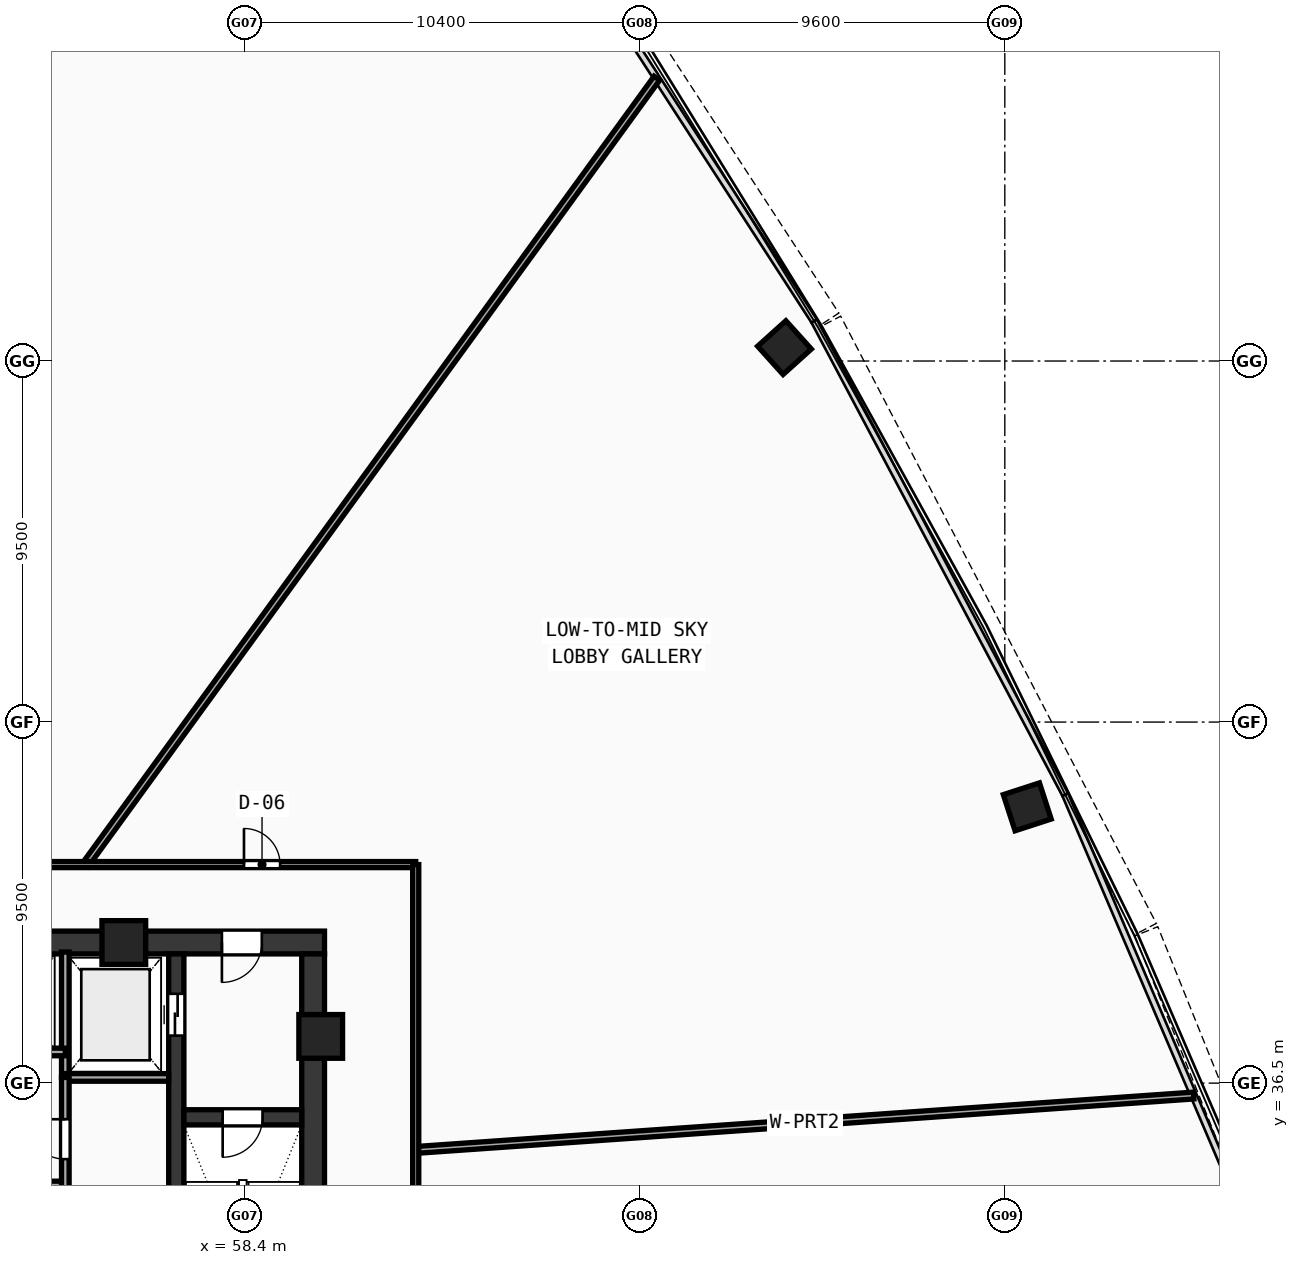
"""IFC4 building model, lengths in metres.
Left out: names, types, materials, properties, quantities, classifications, styles, units other than length and angle.
Written with IfcOpenShell. Run it as: python <this file> out.ifc"""

import sys

from ifc_helpers import new_model, si_unit, direction, frame, frame_2d, origin, origin_with_axes, origin_2d, place, context, subcontext, project, spatial, rectangle, hollow_rectangle, extrude, source, transform, mapped, element, fill, save


model = new_model("IFC4")
c1 = context("Model", 3, precision=1e-05, world=origin(), true_north=direction((0.0, 1.0)))
c2 = subcontext(c1, "Body", "Model", "MODEL_VIEW")
j1 = project(units=[si_unit("LENGTHUNIT", "METRE"), si_unit("PLANEANGLEUNIT", "RADIAN")], contexts=[c1])
p1 = place(None, origin())
s1 = spatial("IfcSite", under=j1, at=p1, CompositionType="ELEMENT")
p2 = place(p1, origin())
s2 = spatial("IfcBuilding", under=s1, at=p2, CompositionType="ELEMENT")
p3 = place(p2, frame((0.0, 0.0, 119.18)))
s3 = spatial("IfcBuildingStorey", under=s2, at=p3, CompositionType="ELEMENT", Elevation=119.18)
p4 = place(p3, frame((49.2, 40.2, 0.0), z_axis=(0.0, 0.0, 1.0), x_axis=(1.0, 0.0, 0.0)))
e1 = element("IfcWall", 1, at=p4, inside=s3, PredefinedType="SHEAR", context=c2, shape_type="SweptSolid", body=[
    extrude(rectangle(XDim=11.3, YDim=0.6, at=frame_2d((5.65, 0.0))), origin(), (0.0, 0.0, 1.0), 5.57),
])
p5 = place(p4, frame((8.6, 0.0, 0.0)))
e2 = element("IfcOpeningElement", 2, at=p5, cuts=e1, PredefinedType="OPENING", context=c2, shape_type="SweptSolid", body=[
    extrude(rectangle(XDim=1.05, YDim=2.1, at=frame_2d((0.525, 1.05))), frame((0.0, 0.31, 0.0), z_axis=(0.0, -1.0, 0.0), x_axis=(1.0, 0.0, 0.0)), (0.0, 0.0, 1.0), 0.62),
])
p6 = place(p3, frame((60.2, 27.8, 0.0), z_axis=(0.0, 0.0, 1.0), x_axis=(0.0, 1.0, 0.0)))
e3 = element("IfcWall", 3, at=p6, inside=s3, PredefinedType="SHEAR", context=c2, shape_type="SweptSolid", body=[
    extrude(rectangle(XDim=12.1, YDim=0.6, at=frame_2d((6.05, 0.0))), origin(), (0.0, 0.0, 1.0), 5.57),
])
p7 = place(p3, frame((56.6, 27.8, 0.0), z_axis=(0.0, 0.0, 1.0), x_axis=(0.0, 1.0, 0.0)))
e4 = element("IfcWall", 4, at=p7, inside=s3, PredefinedType="SHEAR", context=c2, shape_type="SweptSolid", body=[
    extrude(rectangle(XDim=12.1, YDim=0.4, at=frame_2d((6.05, 0.0))), origin(), (0.0, 0.0, 1.0), 5.57),
])
p8 = place(p7, frame((9.95, 0.0, 0.0)))
e5 = element("IfcOpeningElement", 5, at=p8, cuts=e4, PredefinedType="OPENING", context=c2, shape_type="SweptSolid", body=[
    extrude(rectangle(XDim=1.1, YDim=2.1, at=frame_2d((0.55, 1.05))), frame((0.0, 0.21, 0.0), z_axis=(0.0, -1.0, 0.0), x_axis=(1.0, 0.0, 0.0)), (0.0, 0.0, 1.0), 0.42),
])
p9 = place(p3, frame((56.8, 35.6, 0.0), z_axis=(0.0, 0.0, 1.0), x_axis=(1.0, 0.0, 0.0)))
e6 = element("IfcWall", 6, at=p9, inside=s3, PredefinedType="SHEAR", context=c2, shape_type="SweptSolid", body=[
    extrude(rectangle(XDim=3.1, YDim=0.4, at=frame_2d((1.55, 0.0))), origin(), (0.0, 0.0, 1.0), 5.57),
])
p10 = place(p9, frame((1.02, 0.0, 0.0)))
e7 = element("IfcOpeningElement", 7, at=p10, cuts=e6, PredefinedType="OPENING", context=c2, shape_type="SweptSolid", body=[
    extrude(rectangle(XDim=1.05, YDim=2.1, at=frame_2d((0.525, 1.05))), frame((0.0, 0.21, 0.0), z_axis=(0.0, -1.0, 0.0), x_axis=(1.0, 0.0, 0.0)), (0.0, 0.0, 1.0), 0.42),
])
m1 = source(origin(), c2, "Body", "SweptSolid", [
    extrude(hollow_rectangle(XDim=1.15, YDim=1.15, WallThickness=0.048, at=origin_2d()), origin(), (0.0, 0.0, 1.0), 5.85),
])
for number, where, z_axis, x_axis in (
    (8, (60.4, 37.729, -0.28), (0.0, 0.0, 1.0), (1.0, 0.0, 0.0)),
    (9, (55.219, 40.2, -0.28), (0.0, 0.0, 1.0), (1.0, 0.0, 0.0)),
):
    element("IfcColumn", number, at=place(p3, frame(where, z_axis=z_axis, x_axis=x_axis)), inside=s3, PredefinedType="COLUMN", context=c2, shape_type="MappedRepresentation", body=[
        mapped(m1, transform((0.0, 0.0, 0.0), scale=1.0)),
    ])
m2 = source(origin(), c2, "Body", "SweptSolid", [
    extrude(hollow_rectangle(XDim=1.0, YDim=1.0, WallThickness=0.042, at=origin_2d()), origin(), (0.0, 0.0, 1.0), 5.85),
])
for number, where, z_axis, x_axis in (
    (10, (78.991, 43.77, -0.28), (0.0, 0.0, 1.0), (-0.309, 0.951, 0.0)),
    (11, (72.603, 55.852, -0.28), (0.0, 0.0, 1.0), (-0.669, 0.743, 0.0)),
):
    element("IfcColumn", number, at=place(p3, frame(where, z_axis=z_axis, x_axis=x_axis)), inside=s3, PredefinedType="COLUMN", context=c2, shape_type="MappedRepresentation", body=[
        mapped(m2, transform((0.0, 0.0, 0.0), scale=1.0)),
    ])
p11 = place(p3, frame((53.68, 36.65, 0.0), z_axis=(0.0, 0.0, 1.0), x_axis=(0.0, 1.0, 0.0)))
e12 = element("IfcWall", 12, at=p11, inside=s3, PredefinedType="SOLIDWALL", context=c2, shape_type="SweptSolid", body=[
    extrude(rectangle(XDim=3.3, YDim=0.2, at=frame_2d((1.65, 0.0))), origin(), (0.0, 0.0, 1.0), 5.57),
])
p12 = place(p3, frame((53.68, 36.65, 0.0), z_axis=(0.0, 0.0, 1.0), x_axis=(1.0, 0.0, 0.0)))
e13 = element("IfcWall", 13, at=p12, inside=s3, PredefinedType="SOLIDWALL", context=c2, shape_type="SweptSolid", body=[
    extrude(rectangle(XDim=2.72, YDim=0.2, at=frame_2d((1.36, 0.0))), origin(), (0.0, 0.0, 1.0), 5.57),
])
p13 = place(p3, frame((48.95, 37.32, 0.0), z_axis=(0.0, 0.0, 1.0), x_axis=(1.0, 0.0, 0.0)))
e14 = element("IfcWall", 14, at=p13, inside=s3, PredefinedType="SOLIDWALL", context=c2, shape_type="SweptSolid", body=[
    extrude(rectangle(XDim=4.73, YDim=0.2, at=frame_2d((2.365, 0.0))), origin(), (0.0, 0.0, 1.0), 5.57),
])
p14 = place(p13, frame((0.65, 0.0, 0.0)))
e15 = element("IfcOpeningElement", 15, at=p14, cuts=e14, PredefinedType="OPENING", context=c2, shape_type="SweptSolid", body=[
    extrude(rectangle(XDim=1.05, YDim=2.1, at=frame_2d((0.525, 1.05))), frame((0.0, 0.11, 0.0), z_axis=(0.0, -1.0, 0.0), x_axis=(1.0, 0.0, 0.0)), (0.0, 0.0, 1.0), 0.22),
])
p15 = place(p13, frame((2.95, 0.0, 0.0)))
e16 = element("IfcOpeningElement", 16, at=p15, cuts=e14, PredefinedType="OPENING", context=c2, shape_type="SweptSolid", body=[
    extrude(rectangle(XDim=1.05, YDim=2.1, at=frame_2d((0.525, 1.05))), frame((0.0, 0.11, 0.0), z_axis=(0.0, -1.0, 0.0), x_axis=(1.0, 0.0, 0.0)), (0.0, 0.0, 1.0), 0.22),
])
p16 = place(p3, frame((43.85, 33.82, 0.0), z_axis=(0.0, 0.0, 1.0), x_axis=(1.0, 0.0, 0.0)))
e17 = element("IfcWall", 17, at=p16, inside=s3, PredefinedType="SOLIDWALL", context=c2, shape_type="SweptSolid", body=[
    extrude(rectangle(XDim=9.83, YDim=0.2, at=frame_2d((4.915, 0.0))), origin(), (0.0, 0.0, 1.0), 5.57),
])
p17 = place(p16, frame((0.575, 0.0, 0.0)))
e18 = element("IfcOpeningElement", 18, at=p17, cuts=e17, PredefinedType="OPENING", context=c2, shape_type="SweptSolid", body=[
    extrude(rectangle(XDim=1.05, YDim=2.1, at=frame_2d((0.525, 1.05))), frame((0.0, 0.11, 0.0), z_axis=(0.0, -1.0, 0.0), x_axis=(1.0, 0.0, 0.0)), (0.0, 0.0, 1.0), 0.22),
])
p18 = place(p16, frame((2.875, 0.0, 0.0)))
e19 = element("IfcOpeningElement", 19, at=p18, cuts=e17, PredefinedType="OPENING", context=c2, shape_type="SweptSolid", body=[
    extrude(rectangle(XDim=1.05, YDim=2.1, at=frame_2d((0.525, 1.05))), frame((0.0, 0.11, 0.0), z_axis=(0.0, -1.0, 0.0), x_axis=(1.0, 0.0, 0.0)), (0.0, 0.0, 1.0), 0.22),
])
p19 = place(p16, frame((5.175, 0.0, 0.0)))
e20 = element("IfcOpeningElement", 20, at=p19, cuts=e17, PredefinedType="OPENING", context=c2, shape_type="SweptSolid", body=[
    extrude(rectangle(XDim=1.05, YDim=2.1, at=frame_2d((0.525, 1.05))), frame((0.0, 0.11, 0.0), z_axis=(0.0, -1.0, 0.0), x_axis=(1.0, 0.0, 0.0)), (0.0, 0.0, 1.0), 0.22),
])
p20 = place(p16, frame((7.475, 0.0, 0.0)))
e21 = element("IfcOpeningElement", 21, at=p20, cuts=e17, PredefinedType="OPENING", context=c2, shape_type="SweptSolid", body=[
    extrude(rectangle(XDim=1.05, YDim=2.1, at=frame_2d((0.525, 1.05))), frame((0.0, 0.11, 0.0), z_axis=(0.0, -1.0, 0.0), x_axis=(1.0, 0.0, 0.0)), (0.0, 0.0, 1.0), 0.22),
])
p21 = place(p3, frame((53.68, 27.6, 0.0), z_axis=(0.0, 0.0, 1.0), x_axis=(0.0, 1.0, 0.0)))
e22 = element("IfcWall", 22, at=p21, inside=s3, PredefinedType="SOLIDWALL", context=c2, shape_type="SweptSolid", body=[
    extrude(rectangle(XDim=9.05, YDim=0.2, at=frame_2d((4.525, 0.0))), origin(), (0.0, 0.0, 1.0), 2.22),
])
p22 = place(p21, frame((6.9, 0.0, 0.0)))
e23 = element("IfcOpeningElement", 23, at=p22, cuts=e22, PredefinedType="OPENING", context=c2, shape_type="SweptSolid", body=[
    extrude(rectangle(XDim=1.05, YDim=2.1, at=frame_2d((0.525, 1.05))), frame((0.0, 0.11, 0.0), z_axis=(0.0, -1.0, 0.0), x_axis=(1.0, 0.0, 0.0)), (0.0, 0.0, 1.0), 0.22),
])
p23 = place(p3, frame((62.9, 34.742, 0.0), z_axis=(0.0, 0.0, 1.0), x_axis=(0.99756459993, 0.069748612653, 0.0)))
e24 = element("IfcWall", 24, at=p23, inside=s3, PredefinedType="PARTITIONING", context=c2, shape_type="SweptSolid", body=[
    extrude(rectangle(XDim=20.519, YDim=0.18, at=frame_2d((10.259, 0.0))), origin(), (0.0, 0.0, 1.0), 4.87),
])
p24 = place(p3, frame((54.212, 42.25, 0.0), z_axis=(0.0, 0.0, 1.0), x_axis=(0.587780549385, 0.809020411216, 0.0)))
e25 = element("IfcWall", 25, at=p24, inside=s3, PredefinedType="PARTITIONING", context=c2, shape_type="SweptSolid", body=[
    extrude(rectangle(XDim=25.575, YDim=0.18, at=frame_2d((12.788, 0.0))), origin(), (0.0, 0.0, 1.0), 4.87),
])
p25 = place(p3, frame((45.85, 42.25, 0.0), z_axis=(0.0, 0.0, 1.0), x_axis=(1.0, 0.0, 0.0)))
e26 = element("IfcWall", 26, at=p25, inside=s3, PredefinedType="PARTITIONING", context=c2, shape_type="SweptSolid", body=[
    extrude(rectangle(XDim=17.05, YDim=0.16, at=frame_2d((8.525, 0.0))), origin(), (0.0, 0.0, 1.0), 2.22),
])
p26 = place(p25, frame((12.531, 0.0, 0.0)))
e27 = element("IfcOpeningElement", 27, at=p26, cuts=e26, PredefinedType="OPENING", context=c2, shape_type="SweptSolid", body=[
    extrude(rectangle(XDim=0.95, YDim=2.1, at=frame_2d((0.475, 1.05))), frame((0.0, 0.09, 0.0), z_axis=(0.0, -1.0, 0.0), x_axis=(1.0, 0.0, 0.0)), (0.0, 0.0, 1.0), 0.18),
])
p27 = place(p3, frame((62.9, 42.25, 0.0), z_axis=(0.0, 0.0, 1.0), x_axis=(0.0, -1.0, 0.0)))
e28 = element("IfcWall", 28, at=p27, inside=s3, PredefinedType="PARTITIONING", context=c2, shape_type="SweptSolid", body=[
    extrude(rectangle(XDim=17.35, YDim=0.16, at=frame_2d((8.675, 0.0))), origin(), (0.0, 0.0, 1.0), 2.22),
])
p28 = place(p27, frame((12.254, 0.0, 0.0)))
e29 = element("IfcOpeningElement", 29, at=p28, cuts=e28, PredefinedType="OPENING", context=c2, shape_type="SweptSolid", body=[
    extrude(rectangle(XDim=0.95, YDim=2.1, at=frame_2d((0.475, 1.05))), frame((0.0, 0.09, 0.0), z_axis=(0.0, -1.0, 0.0), x_axis=(1.0, 0.0, 0.0)), (0.0, 0.0, 1.0), 0.18),
])
m3 = source(origin(), c2, "Body", "SweptSolid", [
    extrude(rectangle(XDim=1.05, YDim=2.1, at=frame_2d((0.525, 1.05))), frame((0.0, 0.025, 0.0), z_axis=(0.0, -1.0, 0.0), x_axis=(1.0, 0.0, 0.0)), (0.0, 0.0, 1.0), 0.05),
])
p29 = place(p10, frame((1.05, 0.0, 0.0), z_axis=(0.0, 0.0, 1.0), x_axis=(-1.0, 0.0, 0.0)))
e30 = element("IfcDoor", 30, at=p29, inside=s3, OperationType="SINGLE_SWING_RIGHT", PredefinedType="DOOR", context=c2, shape_type="MappedRepresentation", body=[
    mapped(m3, transform((0.0, 0.0, 0.0), scale=1.0)),
])
fill(e7, e30)
p30 = place(p5, frame((1.05, 0.0, 0.0), z_axis=(0.0, 0.0, 1.0), x_axis=(-1.0, 0.0, 0.0)))
e31 = element("IfcDoor", 31, at=p30, inside=s3, OperationType="SINGLE_SWING_RIGHT", PredefinedType="DOOR", context=c2, shape_type="MappedRepresentation", body=[
    mapped(m3, transform((0.0, 0.0, 0.0), scale=1.0)),
])
fill(e2, e31)
m4 = source(origin(), c2, "Body", "SweptSolid", [
    extrude(rectangle(XDim=1.1, YDim=2.1, at=frame_2d((0.55, 1.05))), frame((0.0, 0.025, 0.0), z_axis=(0.0, -1.0, 0.0), x_axis=(1.0, 0.0, 0.0)), (0.0, 0.0, 1.0), 0.05),
])
p31 = place(p8, origin_with_axes())
e32 = element("IfcDoor", 32, at=p31, inside=s3, OperationType="DOUBLE_DOOR_SLIDING", PredefinedType="DOOR", context=c2, shape_type="MappedRepresentation", body=[
    mapped(m4, transform((0.0, 0.0, 0.0), scale=1.0)),
])
fill(e5, e32)
p32 = place(p22, origin_with_axes())
e33 = element("IfcDoor", 33, at=p32, inside=s3, OperationType="SINGLE_SWING_RIGHT", PredefinedType="DOOR", context=c2, shape_type="MappedRepresentation", body=[
    mapped(m3, transform((0.0, 0.0, 0.0), scale=1.0)),
])
fill(e23, e33)
m5 = source(origin(), c2, "Body", "SweptSolid", [
    extrude(rectangle(XDim=0.95, YDim=2.1, at=frame_2d((0.475, 1.05))), frame((0.0, 0.025, 0.0), z_axis=(0.0, -1.0, 0.0), x_axis=(1.0, 0.0, 0.0)), (0.0, 0.0, 1.0), 0.05),
])
p33 = place(p26, origin_with_axes())
e34 = element("IfcDoor", 34, at=p33, inside=s3, OperationType="SINGLE_SWING_LEFT", PredefinedType="DOOR", context=c2, shape_type="MappedRepresentation", body=[
    mapped(m5, transform((0.0, 0.0, 0.0), scale=1.0)),
])
fill(e27, e34)
save(model, sys.argv[1])
